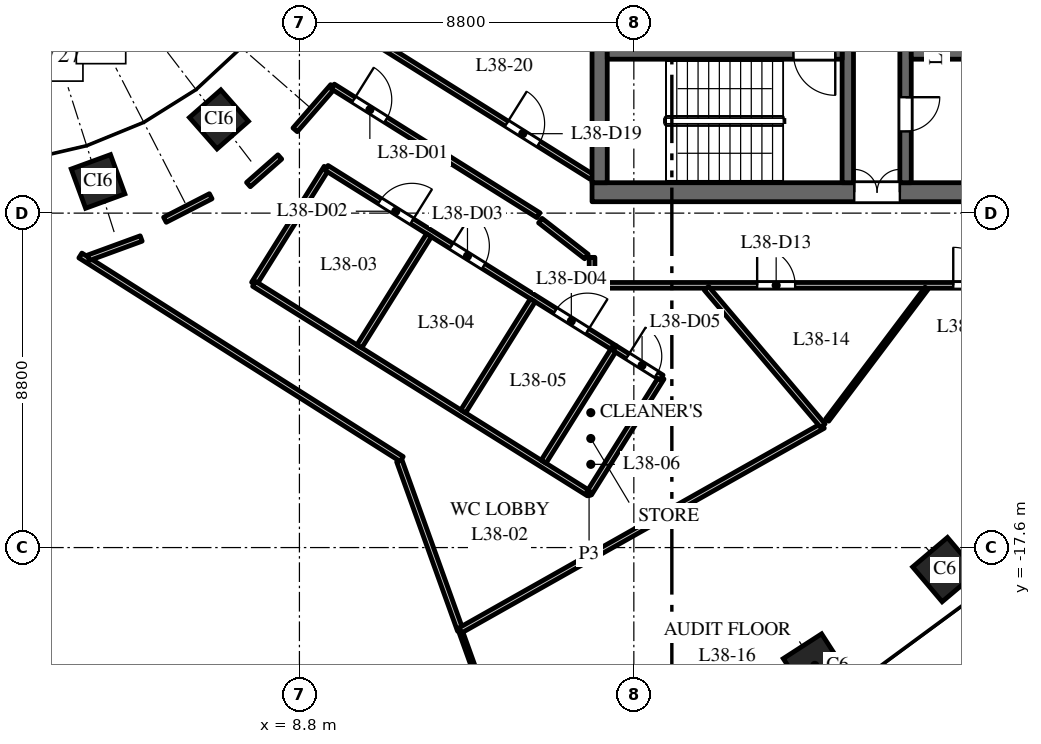
"""IFC4 building model, lengths in metres.
Left out: names, types, materials, properties, quantities, classifications, styles, units other than length and angle.
Written with IfcOpenShell. Run it as: python <this file> out.ifc"""

import sys

from ifc_helpers import new_model, si_unit, direction, frame, frame_2d, origin, origin_2d, place, context, subcontext, project, spatial, rectangle, extrude, element, fill, save


model = new_model("IFC4")
c1 = context("Model", 3, precision=1e-05, world=origin(), true_north=direction((0.0, 1.0)))
c2 = subcontext(c1, "Body", "Model", "MODEL_VIEW")
j1 = project(units=[si_unit("LENGTHUNIT", "METRE"), si_unit("PLANEANGLEUNIT", "RADIAN")], contexts=[c1])
p1 = place(None, origin())
s1 = spatial("IfcSite", under=j1, at=p1, CompositionType="ELEMENT")
p2 = place(p1, origin())
s2 = spatial("IfcBuilding", under=s1, at=p2, CompositionType="ELEMENT")
p3 = place(p2, frame((0.0, 0.0, 166.0)))
s3 = spatial("IfcBuildingStorey", under=s2, at=p3, CompositionType="ELEMENT", Elevation=166.0)
for number, where, z_axis, x_axis in (
    (1, (22.362, -20.7, 0.0), (0.0, 0.0, 1.0), (0.84, 0.542, 0.0)),
    (2, (25.783, -18.18, 0.0), (0.0, 0.0, 1.0), (0.763, 0.646, 0.0)),
):
    element("IfcColumn", number, at=place(p3, frame(where, z_axis=z_axis, x_axis=x_axis)), inside=s3, PredefinedType="COLUMN", context=c2, shape_type="SweptSolid", body=[
        extrude(rectangle(XDim=1.2, YDim=1.2, at=origin_2d()), origin(), (0.0, 0.0, 1.0), 4.0),
    ])
for number, where, z_axis, x_axis in (
    (3, (3.501, -7.967, 0.0), (0.0, 0.0, 1.0), (0.939, 0.344, 0.0)),
    (4, (6.682, -6.334, 0.0), (0.0, 0.0, 1.0), (0.751, 0.66, 0.0)),
):
    element("IfcColumn", number, at=place(p3, frame(where, z_axis=z_axis, x_axis=x_axis)), inside=s3, PredefinedType="COLUMN", context=c2, shape_type="SweptSolid", body=[
        extrude(rectangle(XDim=1.1, YDim=1.1, at=origin_2d()), origin(), (0.0, 0.0, 1.0), 4.0),
    ])
p4 = place(p3, frame((16.5, -8.25, 0.0), z_axis=(0.0, 0.0, 1.0), x_axis=(1.0, 0.0, 0.0)))
e5 = element("IfcWall", 5, at=p4, inside=s3, PredefinedType="SHEAR", context=c2, shape_type="SweptSolid", body=[
    extrude(rectangle(XDim=15.0, YDim=0.5, at=frame_2d((7.5, 0.0))), origin(), (0.0, 0.0, 1.0), 3.7),
])
p5 = place(p4, frame((6.9, 0.0, 0.0)))
e6 = element("IfcOpeningElement", 6, at=p5, cuts=e5, PredefinedType="OPENING", context=c2, shape_type="SweptSolid", body=[
    extrude(rectangle(XDim=1.2, YDim=2.1, at=frame_2d((0.6, 1.05))), frame((0.0, 0.26, 0.0), z_axis=(0.0, -1.0, 0.0), x_axis=(1.0, 0.0, 0.0)), (0.0, 0.0, 1.0), 0.52),
])
p6 = place(p4, frame((12.95, 0.0, 0.0)))
e7 = element("IfcOpeningElement", 7, at=p6, cuts=e5, PredefinedType="OPENING", context=c2, shape_type="SweptSolid", body=[
    extrude(rectangle(XDim=0.9, YDim=2.1, at=frame_2d((0.45, 1.05))), frame((0.0, 0.26, 0.0), z_axis=(0.0, -1.0, 0.0), x_axis=(1.0, 0.0, 0.0)), (0.0, 0.0, 1.0), 0.52),
])
p7 = place(p3, frame((24.75, -8.0, 0.0), z_axis=(0.0, 0.0, 1.0), x_axis=(0.0, 1.0, 0.0)))
e8 = element("IfcWall", 8, at=p7, inside=s3, PredefinedType="SHEAR", context=c2, shape_type="SweptSolid", body=[
    extrude(rectangle(XDim=16.0, YDim=0.3, at=frame_2d((8.0, 0.0))), origin(), (0.0, 0.0, 1.0), 3.7),
])
p8 = place(p7, frame((4.425, 0.0, 0.0)))
e9 = element("IfcOpeningElement", 9, at=p8, cuts=e8, PredefinedType="OPENING", context=c2, shape_type="SweptSolid", body=[
    extrude(rectangle(XDim=1.1, YDim=2.1, at=frame_2d((0.55, 1.05))), frame((0.0, 0.16, 0.0), z_axis=(0.0, -1.0, 0.0), x_axis=(1.0, 0.0, 0.0)), (0.0, 0.0, 1.0), 0.32),
])
p9 = place(p7, frame((7.45, 0.0, 0.0)))
e10 = element("IfcOpeningElement", 10, at=p9, cuts=e8, PredefinedType="OPENING", context=c2, shape_type="SweptSolid", body=[
    extrude(rectangle(XDim=1.1, YDim=2.1, at=frame_2d((0.55, 1.05))), frame((0.0, 0.16, 0.0), z_axis=(0.0, -1.0, 0.0), x_axis=(1.0, 0.0, 0.0)), (0.0, 0.0, 1.0), 0.32),
])
p10 = place(p7, frame((10.475, 0.0, 0.0)))
e11 = element("IfcOpeningElement", 11, at=p10, cuts=e8, PredefinedType="OPENING", context=c2, shape_type="SweptSolid", body=[
    extrude(rectangle(XDim=1.1, YDim=2.1, at=frame_2d((0.55, 1.05))), frame((0.0, 0.16, 0.0), z_axis=(0.0, -1.0, 0.0), x_axis=(1.0, 0.0, 0.0)), (0.0, 0.0, 1.0), 0.32),
])
p11 = place(p7, frame((13.125, 0.0, 0.0)))
e12 = element("IfcOpeningElement", 12, at=p11, cuts=e8, PredefinedType="OPENING", context=c2, shape_type="SweptSolid", body=[
    extrude(rectangle(XDim=0.9, YDim=2.1, at=frame_2d((0.45, 1.05))), frame((0.0, 0.16, 0.0), z_axis=(0.0, -1.0, 0.0), x_axis=(1.0, 0.0, 0.0)), (0.0, 0.0, 1.0), 0.32),
])
p12 = place(p7, frame((14.75, 0.0, 0.0)))
e13 = element("IfcOpeningElement", 13, at=p12, cuts=e8, PredefinedType="OPENING", context=c2, shape_type="SweptSolid", body=[
    extrude(rectangle(XDim=0.9, YDim=2.1, at=frame_2d((0.45, 1.05))), frame((0.0, 0.16, 0.0), z_axis=(0.0, -1.0, 0.0), x_axis=(1.0, 0.0, 0.0)), (0.0, 0.0, 1.0), 0.32),
])
p13 = place(p7, frame((1.35, 0.0, 0.0)))
e14 = element("IfcOpeningElement", 14, at=p13, cuts=e8, PredefinedType="OPENING", context=c2, shape_type="SweptSolid", body=[
    extrude(rectangle(XDim=0.9, YDim=2.1, at=frame_2d((0.45, 1.05))), frame((0.0, 0.16, 0.0), z_axis=(0.0, -1.0, 0.0), x_axis=(1.0, 0.0, 0.0)), (0.0, 0.0, 1.0), 0.32),
])
p14 = place(p3, frame((16.7, -8.0, 0.0), z_axis=(0.0, 0.0, 1.0), x_axis=(0.0, 1.0, 0.0)))
e15 = element("IfcWall", 15, at=p14, inside=s3, PredefinedType="SHEAR", context=c2, shape_type="SweptSolid", body=[
    extrude(rectangle(XDim=16.0, YDim=0.4, at=frame_2d((8.0, 0.0))), origin(), (0.0, 0.0, 1.0), 3.7),
])
p15 = place(p3, frame((24.9, -4.6, 0.0), z_axis=(0.0, 0.0, 1.0), x_axis=(1.0, 0.0, 0.0)))
e16 = element("IfcWall", 16, at=p15, inside=s3, PredefinedType="SHEAR", context=c2, shape_type="SweptSolid", body=[
    extrude(rectangle(XDim=6.1, YDim=0.3, at=frame_2d((3.05, 0.0))), origin(), (0.0, 0.0, 1.0), 3.7),
])
p16 = place(p3, frame((23.23, -8.0, 0.0), z_axis=(0.0, 0.0, 1.0), x_axis=(0.0, 1.0, 0.0)))
e17 = element("IfcWall", 17, at=p16, inside=s3, PredefinedType="SHEAR", context=c2, shape_type="SweptSolid", body=[
    extrude(rectangle(XDim=7.875, YDim=0.3, at=frame_2d((3.938, 0.0))), origin(), (0.0, 0.0, 1.0), 3.7),
])
p17 = place(p16, frame((5.15, 0.0, 0.0)))
e18 = element("IfcOpeningElement", 18, at=p17, cuts=e17, PredefinedType="OPENING", context=c2, shape_type="SweptSolid", body=[
    extrude(rectangle(XDim=1.1, YDim=2.1, at=frame_2d((0.55, 1.05))), frame((0.0, 0.16, 0.0), z_axis=(0.0, -1.0, 0.0), x_axis=(1.0, 0.0, 0.0)), (0.0, 0.0, 1.0), 0.32),
])
p18 = place(p3, frame((16.9, -4.6, 0.0), z_axis=(0.0, 0.0, 1.0), x_axis=(1.0, 0.0, 0.0)))
e19 = element("IfcWall", 19, at=p18, inside=s3, PredefinedType="SHEAR", context=c2, shape_type="SweptSolid", body=[
    extrude(rectangle(XDim=6.18, YDim=0.3, at=frame_2d((3.09, 0.0))), origin(), (0.0, 0.0, 1.0), 3.7),
])
p19 = place(p18, frame((4.9, 0.0, 0.0)))
e20 = element("IfcOpeningElement", 20, at=p19, cuts=e19, PredefinedType="OPENING", context=c2, shape_type="SweptSolid", body=[
    extrude(rectangle(XDim=1.1, YDim=2.1, at=frame_2d((0.55, 1.05))), frame((0.0, 0.16, 0.0), z_axis=(0.0, -1.0, 0.0), x_axis=(1.0, 0.0, 0.0)), (0.0, 0.0, 1.0), 0.32),
])
p20 = place(p3, frame((3.036, -9.915, 0.0), z_axis=(0.0, 0.0, 1.0), x_axis=(0.844814664865, -0.535059045367, 0.0)))
e21 = element("IfcWall", 21, at=p20, inside=s3, PredefinedType="PARTITIONING", context=c2, shape_type="SweptSolid", body=[
    extrude(rectangle(XDim=10.008, YDim=0.15, at=frame_2d((5.004, 0.0))), origin(), (0.0, 0.0, 1.0), 2.85),
])
p21 = place(p3, frame((3.245, -9.977, 0.0), z_axis=(0.0, 0.0, 1.0), x_axis=(0.939083928338, 0.343687904263, 0.0)))
e22 = element("IfcWall", 22, at=p21, inside=s3, PredefinedType="PARTITIONING", context=c2, shape_type="SweptSolid", body=[
    extrude(rectangle(XDim=1.481, YDim=0.15, at=frame_2d((0.741, 0.0))), origin(), (0.0, 0.0, 1.0), 3.7),
])
p22 = place(p3, frame((5.261, -8.975, 0.0), z_axis=(0.0, 0.0, 1.0), x_axis=(0.889472002788, 0.456989667559, 0.0)))
e23 = element("IfcWall", 23, at=p22, inside=s3, PredefinedType="PARTITIONING", context=c2, shape_type="SweptSolid", body=[
    extrude(rectangle(XDim=1.355, YDim=0.15, at=frame_2d((0.677, 0.0))), origin(), (0.0, 0.0, 1.0), 2.85),
])
p23 = place(p3, frame((7.458, -8.049, 0.0), z_axis=(0.0, 0.0, 1.0), x_axis=(0.75060787095, 0.660747927782, 0.0)))
e24 = element("IfcWall", 24, at=p23, inside=s3, PredefinedType="PARTITIONING", context=c2, shape_type="SweptSolid", body=[
    extrude(rectangle(XDim=1.1, YDim=0.15, at=frame_2d((0.55, 0.0))), origin(), (0.0, 0.0, 1.0), 3.7),
])
p24 = place(p3, frame((7.605, -10.659, 0.0), z_axis=(0.0, 0.0, 1.0), x_axis=(0.530602380468, 0.847620855006, 0.0)))
e25 = element("IfcWall", 25, at=p24, inside=s3, PredefinedType="PARTITIONING", context=c2, shape_type="SweptSolid", body=[
    extrude(rectangle(XDim=3.6, YDim=0.15, at=frame_2d((1.8, 0.0))), origin(), (0.0, 0.0, 1.0), 3.7),
])
p25 = place(p3, frame((7.608, -10.661, 0.0), z_axis=(0.0, 0.0, 1.0), x_axis=(0.847562482532, -0.530695617284, 0.0)))
e26 = element("IfcWall", 26, at=p25, inside=s3, PredefinedType="PARTITIONING", context=c2, shape_type="SweptSolid", body=[
    extrude(rectangle(XDim=10.392, YDim=0.15, at=frame_2d((5.196, 0.0))), origin(), (0.0, 0.0, 1.0), 3.7),
])
p26 = place(p3, frame((8.687, -6.609, 0.0), z_axis=(0.0, 0.0, 1.0), x_axis=(0.656454677423, 0.75436546613, 0.0)))
e27 = element("IfcWall", 27, at=p26, inside=s3, PredefinedType="PARTITIONING", context=c2, shape_type="SweptSolid", body=[
    extrude(rectangle(XDim=1.511, YDim=0.15, at=frame_2d((0.755, 0.0))), origin(), (0.0, 0.0, 1.0), 3.7),
])
p27 = place(p3, frame((9.514, -7.61, 0.0), z_axis=(0.0, 0.0, 1.0), x_axis=(0.847740567707, -0.530411095155, 0.0)))
e28 = element("IfcWall", 28, at=p27, inside=s3, PredefinedType="PARTITIONING", context=c2, shape_type="SweptSolid", body=[
    extrude(rectangle(XDim=8.944, YDim=0.15, at=frame_2d((4.472, 0.0))), origin(), (0.0, 0.0, 1.0), 3.7),
])
p28 = place(p27, frame((1.65, 0.0, 0.0)))
e29 = element("IfcOpeningElement", 29, at=p28, cuts=e28, PredefinedType="OPENING", context=c2, shape_type="SweptSolid", body=[
    extrude(rectangle(XDim=1.0, YDim=2.1, at=frame_2d((0.5, 1.05))), frame((0.0, 0.085, 0.0), z_axis=(0.0, -1.0, 0.0), x_axis=(1.0, 0.0, 0.0)), (0.0, 0.0, 1.0), 0.17),
])
p29 = place(p27, frame((3.874, 0.0, 0.0)))
e30 = element("IfcOpeningElement", 30, at=p29, cuts=e28, PredefinedType="OPENING", context=c2, shape_type="SweptSolid", body=[
    extrude(rectangle(XDim=1.0, YDim=2.1, at=frame_2d((0.5, 1.05))), frame((0.0, 0.085, 0.0), z_axis=(0.0, -1.0, 0.0), x_axis=(1.0, 0.0, 0.0)), (0.0, 0.0, 1.0), 0.17),
])
p30 = place(p27, frame((7.098, 0.0, 0.0)))
e31 = element("IfcOpeningElement", 31, at=p30, cuts=e28, PredefinedType="OPENING", context=c2, shape_type="SweptSolid", body=[
    extrude(rectangle(XDim=1.0, YDim=2.1, at=frame_2d((0.5, 1.05))), frame((0.0, 0.085, 0.0), z_axis=(0.0, -1.0, 0.0), x_axis=(1.0, 0.0, 0.0)), (0.0, 0.0, 1.0), 0.17),
])
p31 = place(p3, frame((9.679, -5.469, 0.0), z_axis=(0.0, 0.0, 1.0), x_axis=(0.847602682855, -0.530631408811, 0.0)))
e32 = element("IfcWall", 32, at=p31, inside=s3, PredefinedType="PARTITIONING", context=c2, shape_type="SweptSolid", body=[
    extrude(rectangle(XDim=6.383, YDim=0.15, at=frame_2d((3.191, 0.0))), origin(), (0.0, 0.0, 1.0), 3.7),
])
p32 = place(p31, frame((0.65, 0.0, 0.0)))
e33 = element("IfcOpeningElement", 33, at=p32, cuts=e32, PredefinedType="OPENING", context=c2, shape_type="SweptSolid", body=[
    extrude(rectangle(XDim=1.0, YDim=2.1, at=frame_2d((0.5, 1.05))), frame((0.0, 0.085, 0.0), z_axis=(0.0, -1.0, 0.0), x_axis=(1.0, 0.0, 0.0)), (0.0, 0.0, 1.0), 0.17),
])
p33 = place(p3, frame((10.377, -12.306, 0.0), z_axis=(0.0, 0.0, 1.0), x_axis=(0.530889428354, 0.847441098167, 0.0)))
e34 = element("IfcWall", 34, at=p33, inside=s3, PredefinedType="PARTITIONING", context=c2, shape_type="SweptSolid", body=[
    extrude(rectangle(XDim=3.449, YDim=0.15, at=frame_2d((1.725, 0.0))), origin(), (0.0, 0.0, 1.0), 3.7),
])
p34 = place(p3, frame((10.752, -4.254, 0.0), z_axis=(0.0, 0.0, 1.0), x_axis=(0.847690706888, -0.530490777917, 0.0)))
e35 = element("IfcWall", 35, at=p34, inside=s3, PredefinedType="PARTITIONING", context=c2, shape_type="SweptSolid", body=[
    extrude(rectangle(XDim=6.781, YDim=0.15, at=frame_2d((3.39, 0.0))), origin(), (0.0, 0.0, 1.0), 3.7),
])
p35 = place(p34, frame((4.129, 0.0, 0.0)))
e36 = element("IfcOpeningElement", 36, at=p35, cuts=e35, PredefinedType="OPENING", context=c2, shape_type="SweptSolid", body=[
    extrude(rectangle(XDim=1.0, YDim=2.1, at=frame_2d((0.5, 1.05))), frame((0.0, 0.085, 0.0), z_axis=(0.0, -1.0, 0.0), x_axis=(1.0, 0.0, 0.0)), (0.0, 0.0, 1.0), 0.17),
])
p36 = place(p3, frame((11.429, -15.32, 0.0), z_axis=(0.0, 0.0, 1.0), x_axis=(0.338520464006, -0.940959029634, 0.0)))
e37 = element("IfcWall", 37, at=p36, inside=s3, PredefinedType="PARTITIONING", context=c2, shape_type="SweptSolid", body=[
    extrude(rectangle(XDim=4.735, YDim=0.15, at=frame_2d((2.368, 0.0))), origin(), (0.0, 0.0, 1.0), 3.7),
])
p37 = place(p3, frame((13.032, -19.776, 0.0), z_axis=(0.0, 0.0, 1.0), x_axis=(0.338352371411, -0.941019485856, 0.0)))
e38 = element("IfcWall", 38, at=p37, inside=s3, PredefinedType="PARTITIONING", context=c2, shape_type="SweptSolid", body=[
    extrude(rectangle(XDim=5.959, YDim=0.1, at=frame_2d((2.979, 0.0))), origin(), (0.0, 0.0, 1.0), 2.85),
])
p38 = place(p3, frame((13.034, -19.779, 0.0), z_axis=(0.0, 0.0, 1.0), x_axis=(0.870903388322, 0.491454258512, 0.0)))
e39 = element("IfcWall", 39, at=p38, inside=s3, PredefinedType="PARTITIONING", context=c2, shape_type="SweptSolid", body=[
    extrude(rectangle(XDim=10.955, YDim=0.15, at=frame_2d((5.478, 0.0))), origin(), (0.0, 0.0, 1.0), 3.7),
])
p39 = place(p3, frame((13.11, -14.017, 0.0), z_axis=(0.0, 0.0, 1.0), x_axis=(0.530603340991, 0.847620253727, 0.0)))
e40 = element("IfcWall", 40, at=p39, inside=s3, PredefinedType="PARTITIONING", context=c2, shape_type="SweptSolid", body=[
    extrude(rectangle(XDim=3.448, YDim=0.15, at=frame_2d((1.724, 0.0))), origin(), (0.0, 0.0, 1.0), 3.7),
])
p40 = place(p3, frame((15.226, -15.341, 0.0), z_axis=(0.0, 0.0, 1.0), x_axis=(0.530602850446, 0.847620560805, 0.0)))
e41 = element("IfcWall", 41, at=p40, inside=s3, PredefinedType="PARTITIONING", context=c2, shape_type="SweptSolid", body=[
    extrude(rectangle(XDim=3.524, YDim=0.15, at=frame_2d((1.762, 0.0))), origin(), (0.0, 0.0, 1.0), 3.7),
])
p41 = place(p3, frame((16.422, -16.175, 0.0), z_axis=(0.0, 0.0, 1.0), x_axis=(0.530578570881, 0.84763575911, 0.0)))
e42 = element("IfcWall", 42, at=p41, inside=s3, PredefinedType="PARTITIONING", context=c2, shape_type="SweptSolid", body=[
    extrude(rectangle(XDim=3.596, YDim=0.15, at=frame_2d((1.798, 0.0))), origin(), (0.0, 0.0, 1.0), 3.7),
])
p42 = place(p3, frame((16.5, -10.7, 0.0), z_axis=(0.0, 0.0, 1.0), x_axis=(0.0, 1.0, 0.0)))
e43 = element("IfcWall", 43, at=p42, inside=s3, PredefinedType="PARTITIONING", context=c2, shape_type="SweptSolid", body=[
    extrude(rectangle(XDim=0.736, YDim=0.15, at=frame_2d((0.368, 0.0))), origin(), (0.0, 0.0, 1.0), 3.7),
])
p43 = place(p3, frame((16.5, -10.7, 0.0), z_axis=(0.0, 0.0, 1.0), x_axis=(1.0, 0.0, 0.0)))
e44 = element("IfcWall", 44, at=p43, inside=s3, PredefinedType="PARTITIONING", context=c2, shape_type="SweptSolid", body=[
    extrude(rectangle(XDim=15.0, YDim=0.15, at=frame_2d((7.5, 0.0))), origin(), (0.0, 0.0, 1.0), 2.75),
])
p44 = place(p43, frame((4.345, 0.0, 0.0)))
e45 = element("IfcOpeningElement", 45, at=p44, cuts=e44, PredefinedType="OPENING", context=c2, shape_type="SweptSolid", body=[
    extrude(rectangle(XDim=1.0, YDim=2.1, at=frame_2d((0.5, 1.05))), frame((0.0, 0.085, 0.0), z_axis=(0.0, -1.0, 0.0), x_axis=(1.0, 0.0, 0.0)), (0.0, 0.0, 1.0), 0.17),
])
p45 = place(p43, frame((9.505, 0.0, 0.0)))
e46 = element("IfcOpeningElement", 46, at=p45, cuts=e44, PredefinedType="OPENING", context=c2, shape_type="SweptSolid", body=[
    extrude(rectangle(XDim=1.0, YDim=2.1, at=frame_2d((0.5, 1.05))), frame((0.0, 0.085, 0.0), z_axis=(0.0, -1.0, 0.0), x_axis=(1.0, 0.0, 0.0)), (0.0, 0.0, 1.0), 0.17),
])
p46 = place(p3, frame((17.096, -12.354, 0.0), z_axis=(0.0, 0.0, 1.0), x_axis=(0.847498728789, -0.530797423412, 0.0)))
e47 = element("IfcWall", 47, at=p46, inside=s3, PredefinedType="PARTITIONING", context=c2, shape_type="SweptSolid", body=[
    extrude(rectangle(XDim=1.456, YDim=0.15, at=frame_2d((0.728, 0.0))), origin(), (0.0, 0.0, 1.0), 3.7),
])
p47 = place(p46, frame((0.4, 0.0, 0.0)))
e48 = element("IfcOpeningElement", 48, at=p47, cuts=e47, PredefinedType="OPENING", context=c2, shape_type="SweptSolid", body=[
    extrude(rectangle(XDim=0.9, YDim=2.1, at=frame_2d((0.45, 1.05))), frame((0.0, 0.085, 0.0), z_axis=(0.0, -1.0, 0.0), x_axis=(1.0, 0.0, 0.0)), (0.0, 0.0, 1.0), 0.17),
])
p48 = place(p3, frame((19.511, -10.778, 0.0), z_axis=(0.0, 0.0, 1.0), x_axis=(0.646369264436, -0.763024753197, 0.0)))
e49 = element("IfcWall", 49, at=p48, inside=s3, PredefinedType="PARTITIONING", context=c2, shape_type="SweptSolid", body=[
    extrude(rectangle(XDim=4.74, YDim=0.15, at=frame_2d((2.37, 0.0))), origin(), (0.0, 0.0, 1.0), 3.7),
])
p49 = place(p3, frame((22.688, -14.245, 0.0), z_axis=(0.0, 0.0, 1.0), x_axis=(0.6020222506, 0.798479310804, 0.0)))
e50 = element("IfcWall", 50, at=p49, inside=s3, PredefinedType="PARTITIONING", context=c2, shape_type="SweptSolid", body=[
    extrude(rectangle(XDim=4.342, YDim=0.1, at=frame_2d((2.171, 0.0))), origin(), (0.0, 0.0, 1.0), 2.75),
])
p50 = place(p3, frame((16.352, -9.942, 0.0), z_axis=(0.0, 0.0, 1.0), x_axis=(-0.788950226826, 0.614457109643, 0.0)))
e51 = element("IfcWall", 51, at=p50, inside=s3, PredefinedType="PARTITIONING", context=c2, shape_type="SweptSolid", body=[
    extrude(rectangle(XDim=1.538, YDim=0.15, at=frame_2d((0.769, 0.0))), origin(), (0.0, 0.0, 1.0), 3.7),
])
p51 = place(p19, origin())
e52 = element("IfcDoor", 52, at=p51, inside=s3, OperationType="SINGLE_SWING_RIGHT", PredefinedType="DOOR", context=c2, shape_type="SweptSolid", body=[
    extrude(rectangle(XDim=1.1, YDim=2.1, at=frame_2d((0.55, 1.05))), frame((0.0, 0.025, 0.0), z_axis=(0.0, -1.0, 0.0), x_axis=(1.0, 0.0, 0.0)), (0.0, 0.0, 1.0), 0.05),
])
fill(e20, e52)
p52 = place(p5, origin())
e53 = element("IfcDoor", 53, at=p52, inside=s3, OperationType="DOUBLE_DOOR_DOUBLE_SWING", PredefinedType="DOOR", context=c2, shape_type="SweptSolid", body=[
    extrude(rectangle(XDim=1.2, YDim=2.1, at=frame_2d((0.6, 1.05))), frame((0.0, 0.025, 0.0), z_axis=(0.0, -1.0, 0.0), x_axis=(1.0, 0.0, 0.0)), (0.0, 0.0, 1.0), 0.05),
])
fill(e6, e53)
p53 = place(p13, origin())
e54 = element("IfcDoor", 54, at=p53, inside=s3, OperationType="SINGLE_SWING_RIGHT", PredefinedType="DOOR", context=c2, shape_type="SweptSolid", body=[
    extrude(rectangle(XDim=0.9, YDim=2.1, at=frame_2d((0.45, 1.05))), frame((0.0, 0.025, 0.0), z_axis=(0.0, -1.0, 0.0), x_axis=(1.0, 0.0, 0.0)), (0.0, 0.0, 1.0), 0.05),
])
fill(e14, e54)
p54 = place(p32, origin())
e55 = element("IfcDoor", 55, at=p54, inside=s3, OperationType="SINGLE_SWING_LEFT", PredefinedType="DOOR", context=c2, shape_type="SweptSolid", body=[
    extrude(rectangle(XDim=1.0, YDim=2.1, at=frame_2d((0.5, 1.05))), frame((0.0, 0.025, 0.0), z_axis=(0.0, -1.0, 0.0), x_axis=(1.0, 0.0, 0.0)), (0.0, 0.0, 1.0), 0.05),
])
fill(e33, e55)
p55 = place(p28, origin())
e56 = element("IfcDoor", 56, at=p55, inside=s3, OperationType="SINGLE_SWING_RIGHT", PredefinedType="DOOR", context=c2, shape_type="SweptSolid", body=[
    extrude(rectangle(XDim=1.0, YDim=2.1, at=frame_2d((0.5, 1.05))), frame((0.0, 0.025, 0.0), z_axis=(0.0, -1.0, 0.0), x_axis=(1.0, 0.0, 0.0)), (0.0, 0.0, 1.0), 0.05),
])
fill(e29, e56)
p56 = place(p29, origin())
e57 = element("IfcDoor", 57, at=p56, inside=s3, OperationType="SINGLE_SWING_LEFT", PredefinedType="DOOR", context=c2, shape_type="SweptSolid", body=[
    extrude(rectangle(XDim=1.0, YDim=2.1, at=frame_2d((0.5, 1.05))), frame((0.0, 0.025, 0.0), z_axis=(0.0, -1.0, 0.0), x_axis=(1.0, 0.0, 0.0)), (0.0, 0.0, 1.0), 0.05),
])
fill(e30, e57)
p57 = place(p30, origin())
e58 = element("IfcDoor", 58, at=p57, inside=s3, OperationType="SINGLE_SWING_RIGHT", PredefinedType="DOOR", context=c2, shape_type="SweptSolid", body=[
    extrude(rectangle(XDim=1.0, YDim=2.1, at=frame_2d((0.5, 1.05))), frame((0.0, 0.025, 0.0), z_axis=(0.0, -1.0, 0.0), x_axis=(1.0, 0.0, 0.0)), (0.0, 0.0, 1.0), 0.05),
])
fill(e31, e58)
p58 = place(p47, origin())
e59 = element("IfcDoor", 59, at=p58, inside=s3, OperationType="SINGLE_SWING_LEFT", PredefinedType="DOOR", context=c2, shape_type="SweptSolid", body=[
    extrude(rectangle(XDim=0.9, YDim=2.1, at=frame_2d((0.45, 1.05))), frame((0.0, 0.025, 0.0), z_axis=(0.0, -1.0, 0.0), x_axis=(1.0, 0.0, 0.0)), (0.0, 0.0, 1.0), 0.05),
])
fill(e48, e59)
p59 = place(p44, origin())
e60 = element("IfcDoor", 60, at=p59, inside=s3, OperationType="SINGLE_SWING_LEFT", PredefinedType="DOOR", context=c2, shape_type="SweptSolid", body=[
    extrude(rectangle(XDim=1.0, YDim=2.1, at=frame_2d((0.5, 1.05))), frame((0.0, 0.025, 0.0), z_axis=(0.0, -1.0, 0.0), x_axis=(1.0, 0.0, 0.0)), (0.0, 0.0, 1.0), 0.05),
])
fill(e45, e60)
p60 = place(p45, origin())
e61 = element("IfcDoor", 61, at=p60, inside=s3, OperationType="SINGLE_SWING_LEFT", PredefinedType="DOOR", context=c2, shape_type="SweptSolid", body=[
    extrude(rectangle(XDim=1.0, YDim=2.1, at=frame_2d((0.5, 1.05))), frame((0.0, 0.025, 0.0), z_axis=(0.0, -1.0, 0.0), x_axis=(1.0, 0.0, 0.0)), (0.0, 0.0, 1.0), 0.05),
])
fill(e46, e61)
p61 = place(p35, origin())
e62 = element("IfcDoor", 62, at=p61, inside=s3, OperationType="SINGLE_SWING_LEFT", PredefinedType="DOOR", context=c2, shape_type="SweptSolid", body=[
    extrude(rectangle(XDim=1.0, YDim=2.1, at=frame_2d((0.5, 1.05))), frame((0.0, 0.025, 0.0), z_axis=(0.0, -1.0, 0.0), x_axis=(1.0, 0.0, 0.0)), (0.0, 0.0, 1.0), 0.05),
])
fill(e36, e62)
save(model, sys.argv[1])
